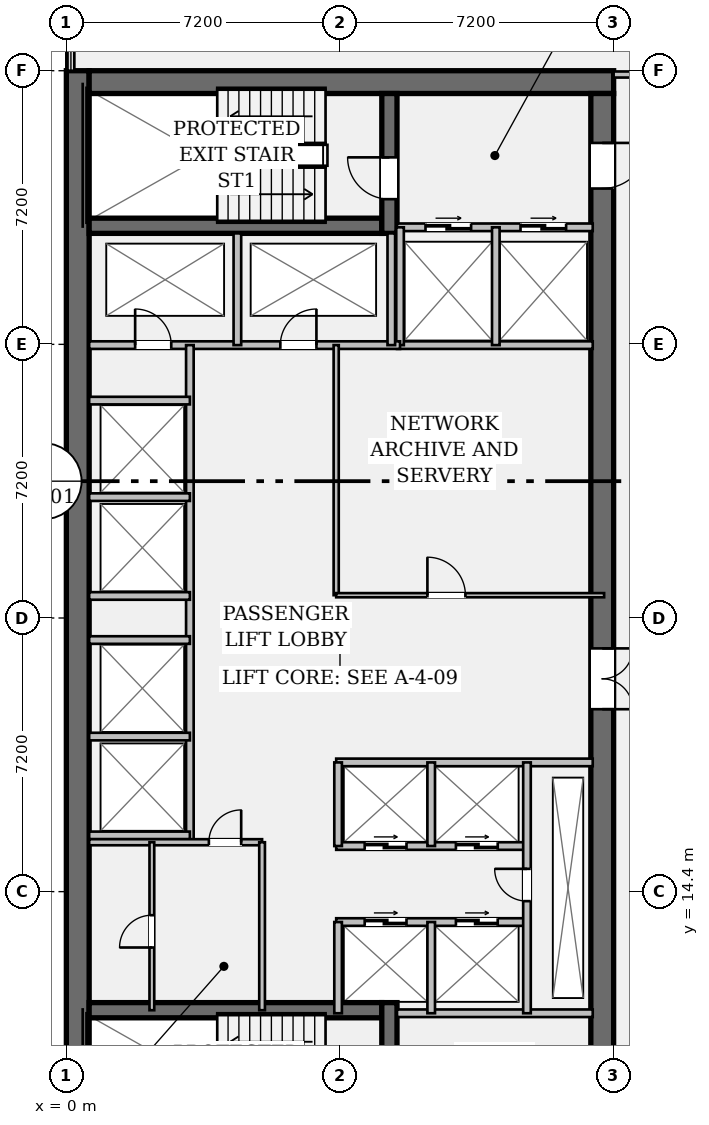
"""IFC4 building model, lengths in metres.
Left out: names, types, materials, properties, quantities, classifications, styles, units other than length and angle.
Written with IfcOpenShell. Run it as: python <this file> out.ifc"""

import sys

from ifc_helpers import new_model, si_unit, direction, frame, frame_2d, origin, place, context, subcontext, project, spatial, rectangle, extrude, element, fill, save


model = new_model("IFC4")
c1 = context("Model", 3, precision=1e-05, world=origin(), true_north=direction((0.0, 1.0)))
c2 = subcontext(c1, "Body", "Model", "MODEL_VIEW")
j1 = project(units=[si_unit("LENGTHUNIT", "METRE"), si_unit("PLANEANGLEUNIT", "RADIAN")], contexts=[c1])
p1 = place(None, origin())
s1 = spatial("IfcSite", under=j1, at=p1, CompositionType="ELEMENT")
p2 = place(p1, origin())
s2 = spatial("IfcBuilding", under=s1, at=p2, CompositionType="ELEMENT")
p3 = place(p2, frame((0.0, 0.0, 148.4)))
s3 = spatial("IfcBuildingStorey", under=s2, at=p3, CompositionType="ELEMENT", Elevation=148.4)
p4 = place(p3, frame((0.3, 7.2, 0.0), z_axis=(0.0, 0.0, 1.0), x_axis=(0.0, 1.0, 0.0)))
e1 = element("IfcWall", 1, at=p4, inside=s3, PredefinedType="SHEAR", context=c2, shape_type="SweptSolid", body=[
    extrude(rectangle(XDim=28.8, YDim=0.6, at=frame_2d((14.4, 0.0))), origin(), (0.0, 0.0, 1.0), 3.58),
])
p5 = place(p3, frame((0.6, 35.7, 0.0), z_axis=(0.0, 0.0, 1.0), x_axis=(1.0, 0.0, 0.0)))
e2 = element("IfcWall", 2, at=p5, inside=s3, PredefinedType="SHEAR", context=c2, shape_type="SweptSolid", body=[
    extrude(rectangle(XDim=13.8, YDim=0.6, at=frame_2d((6.9, 0.0))), origin(), (0.0, 0.0, 1.0), 3.58),
])
p6 = place(p3, frame((14.1, 35.4, 0.0), z_axis=(0.0, 0.0, 1.0), x_axis=(0.0, -1.0, 0.0)))
e3 = element("IfcWall", 3, at=p6, inside=s3, PredefinedType="SHEAR", context=c2, shape_type="SweptSolid", body=[
    extrude(rectangle(XDim=27.6, YDim=0.6, at=frame_2d((13.8, 0.0))), origin(), (0.0, 0.0, 1.0), 3.58),
])
p7 = place(p6, frame((1.3, 0.0, 0.0)))
e4 = element("IfcOpeningElement", 4, at=p7, cuts=e3, PredefinedType="OPENING", context=c2, shape_type="SweptSolid", body=[
    extrude(rectangle(XDim=1.2, YDim=2.15, at=frame_2d((0.6, 1.075))), frame((0.0, 0.312, 0.0), z_axis=(0.0, -1.0, 0.0), x_axis=(1.0, 0.0, 0.0)), (0.0, 0.0, 1.0), 0.624),
])
p8 = place(p6, frame((25.25, 0.0, 0.0)))
e5 = element("IfcOpeningElement", 5, at=p8, cuts=e3, PredefinedType="OPENING", context=c2, shape_type="SweptSolid", body=[
    extrude(rectangle(XDim=1.2, YDim=2.15, at=frame_2d((0.6, 1.075))), frame((0.0, 0.312, 0.0), z_axis=(0.0, -1.0, 0.0), x_axis=(1.0, 0.0, 0.0)), (0.0, 0.0, 1.0), 0.624),
])
p9 = place(p6, frame((14.6, 0.0, 0.0)))
e6 = element("IfcOpeningElement", 6, at=p9, cuts=e3, PredefinedType="OPENING", context=c2, shape_type="SweptSolid", body=[
    extrude(rectangle(XDim=1.6, YDim=2.2, at=frame_2d((0.8, 1.1))), frame((0.0, 0.312, 0.0), z_axis=(0.0, -1.0, 0.0), x_axis=(1.0, 0.0, 0.0)), (0.0, 0.0, 1.0), 0.624),
])
for number, where, z_axis, x_axis in (
    (7, (0.6, 31.92, 0.0), (0.0, 0.0, 1.0), (1.0, 0.0, 0.0)),
    (8, (0.6, 11.28, 0.0), (0.0, 0.0, 1.0), (1.0, 0.0, 0.0)),
):
    element("IfcWall", number, at=place(p3, frame(where, z_axis=z_axis, x_axis=x_axis)), inside=s3, PredefinedType="SHEAR", context=c2, shape_type="SweptSolid", body=[
        extrude(rectangle(XDim=7.7, YDim=0.4, at=frame_2d((3.85, 0.0))), origin(), (0.0, 0.0, 1.0), 3.58),
    ])
p10 = place(p3, frame((8.5, 31.72, 0.0), z_axis=(0.0, 0.0, 1.0), x_axis=(0.0, 1.0, 0.0)))
e9 = element("IfcWall", 9, at=p10, inside=s3, PredefinedType="SHEAR", context=c2, shape_type="SweptSolid", body=[
    extrude(rectangle(XDim=3.68, YDim=0.4, at=frame_2d((1.84, 0.0))), origin(), (0.0, 0.0, 1.0), 3.58),
])
p11 = place(p10, frame((0.9, 0.0, 0.0)))
e10 = element("IfcOpeningElement", 10, at=p11, cuts=e9, PredefinedType="OPENING", context=c2, shape_type="SweptSolid", body=[
    extrude(rectangle(XDim=1.1, YDim=2.15, at=frame_2d((0.55, 1.075))), frame((0.0, 0.212, 0.0), z_axis=(0.0, -1.0, 0.0), x_axis=(1.0, 0.0, 0.0)), (0.0, 0.0, 1.0), 0.424),
])
p12 = place(p3, frame((8.5, 7.8, 0.0), z_axis=(0.0, 0.0, 1.0), x_axis=(0.0, 1.0, 0.0)))
e11 = element("IfcWall", 11, at=p12, inside=s3, PredefinedType="SHEAR", context=c2, shape_type="SweptSolid", body=[
    extrude(rectangle(XDim=3.68, YDim=0.4, at=frame_2d((1.84, 0.0))), origin(), (0.0, 0.0, 1.0), 3.58),
])
p13 = place(p12, frame((0.85, 0.0, 0.0)))
e12 = element("IfcOpeningElement", 12, at=p13, cuts=e11, PredefinedType="OPENING", context=c2, shape_type="SweptSolid", body=[
    extrude(rectangle(XDim=1.1, YDim=2.15, at=frame_2d((0.55, 1.075))), frame((0.0, 0.212, 0.0), z_axis=(0.0, -1.0, 0.0), x_axis=(1.0, 0.0, 0.0)), (0.0, 0.0, 1.0), 0.424),
])
p14 = place(p3, frame((8.7, 31.88, 0.0), z_axis=(0.0, 0.0, 1.0), x_axis=(1.0, 0.0, 0.0)))
e13 = element("IfcWall", 13, at=p14, inside=s3, PredefinedType="PARTITIONING", context=c2, shape_type="SweptSolid", body=[
    extrude(rectangle(XDim=5.15, YDim=0.2, at=frame_2d((2.575, 0.0))), origin(), (0.0, 0.0, 1.0), 3.58),
])
p15 = place(p14, frame((0.75, 0.0, 0.0)))
e14 = element("IfcOpeningElement", 14, at=p15, cuts=e13, PredefinedType="OPENING", context=c2, shape_type="SweptSolid", body=[
    extrude(rectangle(XDim=1.2, YDim=2.2, at=frame_2d((0.6, 1.1))), frame((0.0, 0.112, 0.0), z_axis=(0.0, -1.0, 0.0), x_axis=(1.0, 0.0, 0.0)), (0.0, 0.0, 1.0), 0.224),
])
p16 = place(p14, frame((3.25, 0.0, 0.0)))
e15 = element("IfcOpeningElement", 15, at=p16, cuts=e13, PredefinedType="OPENING", context=c2, shape_type="SweptSolid", body=[
    extrude(rectangle(XDim=1.2, YDim=2.2, at=frame_2d((0.6, 1.1))), frame((0.0, 0.112, 0.0), z_axis=(0.0, -1.0, 0.0), x_axis=(1.0, 0.0, 0.0)), (0.0, 0.0, 1.0), 0.224),
])
for number, where, z_axis, x_axis in (
    (16, (8.7, 11.2, 0.0), (0.0, 0.0, 1.0), (1.0, 0.0, 0.0)),
    (17, (8.7, 28.78, 0.0), (0.0, 0.0, 1.0), (1.0, 0.0, 0.0)),
):
    element("IfcWall", number, at=place(p3, frame(where, z_axis=z_axis, x_axis=x_axis)), inside=s3, PredefinedType="PARTITIONING", context=c2, shape_type="SweptSolid", body=[
        extrude(rectangle(XDim=5.15, YDim=0.2, at=frame_2d((2.575, 0.0))), origin(), (0.0, 0.0, 1.0), 3.58),
    ])
for number, where, z_axis, x_axis in (
    (18, (8.78, 28.78, 0.0), (0.0, 0.0, 1.0), (0.0, 1.0, 0.0)),
    (19, (11.3, 28.78, 0.0), (0.0, 0.0, 1.0), (0.0, 1.0, 0.0)),
):
    element("IfcWall", number, at=place(p3, frame(where, z_axis=z_axis, x_axis=x_axis)), inside=s3, PredefinedType="PARTITIONING", context=c2, shape_type="SweptSolid", body=[
        extrude(rectangle(XDim=3.1, YDim=0.2, at=frame_2d((1.55, 0.0))), origin(), (0.0, 0.0, 1.0), 3.58),
    ])
p17 = place(p3, frame((0.6, 28.78, 0.0), z_axis=(0.0, 0.0, 1.0), x_axis=(1.0, 0.0, 0.0)))
e20 = element("IfcWall", 20, at=p17, inside=s3, PredefinedType="PARTITIONING", context=c2, shape_type="SweptSolid", body=[
    extrude(rectangle(XDim=8.18, YDim=0.2, at=frame_2d((4.09, 0.0))), origin(), (0.0, 0.0, 1.0), 3.58),
])
p18 = place(p17, frame((1.21, 0.0, 0.0)))
e21 = element("IfcOpeningElement", 21, at=p18, cuts=e20, PredefinedType="OPENING", context=c2, shape_type="SweptSolid", body=[
    extrude(rectangle(XDim=0.95, YDim=2.15, at=frame_2d((0.475, 1.075))), frame((0.0, 0.112, 0.0), z_axis=(0.0, -1.0, 0.0), x_axis=(1.0, 0.0, 0.0)), (0.0, 0.0, 1.0), 0.224),
])
p19 = place(p17, frame((5.03, 0.0, 0.0)))
e22 = element("IfcOpeningElement", 22, at=p19, cuts=e20, PredefinedType="OPENING", context=c2, shape_type="SweptSolid", body=[
    extrude(rectangle(XDim=0.95, YDim=2.15, at=frame_2d((0.475, 1.075))), frame((0.0, 0.112, 0.0), z_axis=(0.0, -1.0, 0.0), x_axis=(1.0, 0.0, 0.0)), (0.0, 0.0, 1.0), 0.224),
])
for number, where, z_axis, x_axis in (
    (23, (4.5, 28.78, 0.0), (0.0, 0.0, 1.0), (0.0, 1.0, 0.0)),
    (24, (8.55, 28.78, 0.0), (0.0, 0.0, 1.0), (0.0, 1.0, 0.0)),
):
    element("IfcWall", number, at=place(p3, frame(where, z_axis=z_axis, x_axis=x_axis)), inside=s3, PredefinedType="PARTITIONING", context=c2, shape_type="SweptSolid", body=[
        extrude(rectangle(XDim=2.94, YDim=0.2, at=frame_2d((1.47, 0.0))), origin(), (0.0, 0.0, 1.0), 3.58),
    ])
p20 = place(p3, frame((3.25, 15.7, 0.0), z_axis=(0.0, 0.0, 1.0), x_axis=(0.0, 1.0, 0.0)))
e25 = element("IfcWall", 25, at=p20, inside=s3, PredefinedType="PARTITIONING", context=c2, shape_type="SweptSolid", body=[
    extrude(rectangle(XDim=13.08, YDim=0.2, at=frame_2d((6.54, 0.0))), origin(), (0.0, 0.0, 1.0), 3.58),
])
for number, where, z_axis, x_axis in (
    (26, (0.6, 15.88, 0.0), (0.0, 0.0, 1.0), (1.0, 0.0, 0.0)),
    (27, (0.6, 18.48, 0.0), (0.0, 0.0, 1.0), (1.0, 0.0, 0.0)),
    (28, (0.6, 22.18, 0.0), (0.0, 0.0, 1.0), (1.0, 0.0, 0.0)),
    (29, (0.6, 24.78, 0.0), (0.0, 0.0, 1.0), (1.0, 0.0, 0.0)),
    (30, (0.6, 21.02, 0.0), (0.0, 0.0, 1.0), (1.0, 0.0, 0.0)),
    (31, (0.6, 27.32, 0.0), (0.0, 0.0, 1.0), (1.0, 0.0, 0.0)),
):
    element("IfcWall", number, at=place(p3, frame(where, z_axis=z_axis, x_axis=x_axis)), inside=s3, PredefinedType="PARTITIONING", context=c2, shape_type="SweptSolid", body=[
        extrude(rectangle(XDim=2.65, YDim=0.2, at=frame_2d((1.325, 0.0))), origin(), (0.0, 0.0, 1.0), 3.58),
    ])
p21 = place(p3, frame((7.1, 22.2, 0.0), z_axis=(0.0, 0.0, 1.0), x_axis=(0.0, 1.0, 0.0)))
e32 = element("IfcWall", 32, at=p21, inside=s3, PredefinedType="PARTITIONING", context=c2, shape_type="SweptSolid", body=[
    extrude(rectangle(XDim=6.58, YDim=0.135, at=frame_2d((3.29, 0.0))), origin(), (0.0, 0.0, 1.0), 3.58),
])
p22 = place(p3, frame((7.1, 22.2, 0.0), z_axis=(0.0, 0.0, 1.0), x_axis=(1.0, 0.0, 0.0)))
e33 = element("IfcWall", 33, at=p22, inside=s3, PredefinedType="PARTITIONING", context=c2, shape_type="SweptSolid", body=[
    extrude(rectangle(XDim=7.05, YDim=0.11, at=frame_2d((3.525, 0.0))), origin(), (0.0, 0.0, 1.0), 3.58),
])
p23 = place(p22, frame((2.4, 0.0, 0.0)))
e34 = element("IfcOpeningElement", 34, at=p23, cuts=e33, PredefinedType="OPENING", context=c2, shape_type="SweptSolid", body=[
    extrude(rectangle(XDim=1.0, YDim=2.15, at=frame_2d((0.5, 1.075))), frame((0.0, 0.067, 0.0), z_axis=(0.0, -1.0, 0.0), x_axis=(1.0, 0.0, 0.0)), (0.0, 0.0, 1.0), 0.134),
])
p24 = place(p3, frame((7.1, 17.8, 0.0), z_axis=(0.0, 0.0, 1.0), x_axis=(1.0, 0.0, 0.0)))
e35 = element("IfcWall", 35, at=p24, inside=s3, PredefinedType="PARTITIONING", context=c2, shape_type="SweptSolid", body=[
    extrude(rectangle(XDim=6.75, YDim=0.2, at=frame_2d((3.375, 0.0))), origin(), (0.0, 0.0, 1.0), 3.58),
])
p25 = place(p3, frame((7.1, 15.6, 0.0), z_axis=(0.0, 0.0, 1.0), x_axis=(1.0, 0.0, 0.0)))
e36 = element("IfcWall", 36, at=p25, inside=s3, PredefinedType="PARTITIONING", context=c2, shape_type="SweptSolid", body=[
    extrude(rectangle(XDim=5.02, YDim=0.2, at=frame_2d((2.51, 0.0))), origin(), (0.0, 0.0, 1.0), 3.58),
])
p26 = place(p25, frame((0.75, 0.0, 0.0)))
e37 = element("IfcOpeningElement", 37, at=p26, cuts=e36, PredefinedType="OPENING", context=c2, shape_type="SweptSolid", body=[
    extrude(rectangle(XDim=1.1, YDim=2.2, at=frame_2d((0.55, 1.1))), frame((0.0, 0.112, 0.0), z_axis=(0.0, -1.0, 0.0), x_axis=(1.0, 0.0, 0.0)), (0.0, 0.0, 1.0), 0.224),
])
p27 = place(p25, frame((3.15, 0.0, 0.0)))
e38 = element("IfcOpeningElement", 38, at=p27, cuts=e36, PredefinedType="OPENING", context=c2, shape_type="SweptSolid", body=[
    extrude(rectangle(XDim=1.1, YDim=2.2, at=frame_2d((0.55, 1.1))), frame((0.0, 0.112, 0.0), z_axis=(0.0, -1.0, 0.0), x_axis=(1.0, 0.0, 0.0)), (0.0, 0.0, 1.0), 0.224),
])
p28 = place(p3, frame((7.1, 13.6, 0.0), z_axis=(0.0, 0.0, 1.0), x_axis=(1.0, 0.0, 0.0)))
e39 = element("IfcWall", 39, at=p28, inside=s3, PredefinedType="PARTITIONING", context=c2, shape_type="SweptSolid", body=[
    extrude(rectangle(XDim=5.02, YDim=0.2, at=frame_2d((2.51, 0.0))), origin(), (0.0, 0.0, 1.0), 3.58),
])
p29 = place(p28, frame((0.75, 0.0, 0.0)))
e40 = element("IfcOpeningElement", 40, at=p29, cuts=e39, PredefinedType="OPENING", context=c2, shape_type="SweptSolid", body=[
    extrude(rectangle(XDim=1.1, YDim=2.2, at=frame_2d((0.55, 1.1))), frame((0.0, 0.112, 0.0), z_axis=(0.0, -1.0, 0.0), x_axis=(1.0, 0.0, 0.0)), (0.0, 0.0, 1.0), 0.224),
])
p30 = place(p28, frame((3.15, 0.0, 0.0)))
e41 = element("IfcOpeningElement", 41, at=p30, cuts=e39, PredefinedType="OPENING", context=c2, shape_type="SweptSolid", body=[
    extrude(rectangle(XDim=1.1, YDim=2.2, at=frame_2d((0.55, 1.1))), frame((0.0, 0.112, 0.0), z_axis=(0.0, -1.0, 0.0), x_axis=(1.0, 0.0, 0.0)), (0.0, 0.0, 1.0), 0.224),
])
p31 = place(p3, frame((7.15, 15.6, 0.0), z_axis=(0.0, 0.0, 1.0), x_axis=(0.0, 1.0, 0.0)))
e42 = element("IfcWall", 42, at=p31, inside=s3, PredefinedType="PARTITIONING", context=c2, shape_type="SweptSolid", body=[
    extrude(rectangle(XDim=2.2, YDim=0.2, at=frame_2d((1.1, 0.0))), origin(), (0.0, 0.0, 1.0), 3.58),
])
p32 = place(p3, frame((7.15, 11.2, 0.0), z_axis=(0.0, 0.0, 1.0), x_axis=(0.0, 1.0, 0.0)))
e43 = element("IfcWall", 43, at=p32, inside=s3, PredefinedType="PARTITIONING", context=c2, shape_type="SweptSolid", body=[
    extrude(rectangle(XDim=2.4, YDim=0.2, at=frame_2d((1.2, 0.0))), origin(), (0.0, 0.0, 1.0), 3.58),
])
p33 = place(p3, frame((9.6, 15.6, 0.0), z_axis=(0.0, 0.0, 1.0), x_axis=(0.0, 1.0, 0.0)))
e44 = element("IfcWall", 44, at=p33, inside=s3, PredefinedType="PARTITIONING", context=c2, shape_type="SweptSolid", body=[
    extrude(rectangle(XDim=2.2, YDim=0.2, at=frame_2d((1.1, 0.0))), origin(), (0.0, 0.0, 1.0), 3.58),
])
p34 = place(p3, frame((9.6, 11.2, 0.0), z_axis=(0.0, 0.0, 1.0), x_axis=(0.0, 1.0, 0.0)))
e45 = element("IfcWall", 45, at=p34, inside=s3, PredefinedType="PARTITIONING", context=c2, shape_type="SweptSolid", body=[
    extrude(rectangle(XDim=2.4, YDim=0.2, at=frame_2d((1.2, 0.0))), origin(), (0.0, 0.0, 1.0), 3.58),
])
p35 = place(p3, frame((12.12, 11.2, 0.0), z_axis=(0.0, 0.0, 1.0), x_axis=(0.0, 1.0, 0.0)))
e46 = element("IfcWall", 46, at=p35, inside=s3, PredefinedType="PARTITIONING", context=c2, shape_type="SweptSolid", body=[
    extrude(rectangle(XDim=6.6, YDim=0.2, at=frame_2d((3.3, 0.0))), origin(), (0.0, 0.0, 1.0), 3.58),
])
p36 = place(p35, frame((2.95, 0.0, 0.0)))
e47 = element("IfcOpeningElement", 47, at=p36, cuts=e46, PredefinedType="OPENING", context=c2, shape_type="SweptSolid", body=[
    extrude(rectangle(XDim=0.85, YDim=2.15, at=frame_2d((0.425, 1.075))), frame((0.0, 0.112, 0.0), z_axis=(0.0, -1.0, 0.0), x_axis=(1.0, 0.0, 0.0)), (0.0, 0.0, 1.0), 0.224),
])
p37 = place(p3, frame((0.6, 15.7, 0.0), z_axis=(0.0, 0.0, 1.0), x_axis=(1.0, 0.0, 0.0)))
e48 = element("IfcWall", 48, at=p37, inside=s3, PredefinedType="PARTITIONING", context=c2, shape_type="SweptSolid", body=[
    extrude(rectangle(XDim=4.55, YDim=0.16, at=frame_2d((2.275, 0.0))), origin(), (0.0, 0.0, 1.0), 3.58),
])
p38 = place(p37, frame((3.15, 0.0, 0.0)))
e49 = element("IfcOpeningElement", 49, at=p38, cuts=e48, PredefinedType="OPENING", context=c2, shape_type="SweptSolid", body=[
    extrude(rectangle(XDim=0.85, YDim=2.15, at=frame_2d((0.425, 1.075))), frame((0.0, 0.092, 0.0), z_axis=(0.0, -1.0, 0.0), x_axis=(1.0, 0.0, 0.0)), (0.0, 0.0, 1.0), 0.184),
])
p39 = place(p3, frame((5.15, 11.28, 0.0), z_axis=(0.0, 0.0, 1.0), x_axis=(0.0, 1.0, 0.0)))
e50 = element("IfcWall", 50, at=p39, inside=s3, PredefinedType="PARTITIONING", context=c2, shape_type="SweptSolid", body=[
    extrude(rectangle(XDim=4.42, YDim=0.15, at=frame_2d((2.21, 0.0))), origin(), (0.0, 0.0, 1.0), 3.58),
])
p40 = place(p3, frame((2.25, 11.28, 0.0), z_axis=(0.0, 0.0, 1.0), x_axis=(0.0, 1.0, 0.0)))
e51 = element("IfcWall", 51, at=p40, inside=s3, PredefinedType="PARTITIONING", context=c2, shape_type="SweptSolid", body=[
    extrude(rectangle(XDim=4.42, YDim=0.125, at=frame_2d((2.21, 0.0))), origin(), (0.0, 0.0, 1.0), 3.58),
])
p41 = place(p40, frame((1.65, 0.0, 0.0)))
e52 = element("IfcOpeningElement", 52, at=p41, cuts=e51, PredefinedType="OPENING", context=c2, shape_type="SweptSolid", body=[
    extrude(rectangle(XDim=0.85, YDim=2.15, at=frame_2d((0.425, 1.075))), frame((0.0, 0.074, 0.0), z_axis=(0.0, -1.0, 0.0), x_axis=(1.0, 0.0, 0.0)), (0.0, 0.0, 1.0), 0.149),
])
p42 = place(p3, frame((14.4, 35.9, 0.0), z_axis=(0.0, 0.0, 1.0), x_axis=(1.0, 0.0, 0.0)))
e53 = element("IfcWall", 53, at=p42, inside=s3, PredefinedType="PARTITIONING", context=c2, shape_type="SweptSolid", body=[
    extrude(rectangle(XDim=2.95, YDim=0.16, at=frame_2d((1.475, 0.0))), origin(), (0.0, 0.0, 1.0), 2.869),
])
p43 = place(p42, frame((0.95, 0.0, 0.0)))
e54 = element("IfcOpeningElement", 54, at=p43, cuts=e53, PredefinedType="OPENING", context=c2, shape_type="SweptSolid", body=[
    extrude(rectangle(XDim=1.0, YDim=2.15, at=frame_2d((0.5, 1.075))), frame((0.0, 0.092, 0.0), z_axis=(0.0, -1.0, 0.0), x_axis=(1.0, 0.0, 0.0)), (0.0, 0.0, 1.0), 0.184),
])
p44 = place(p11, origin())
e55 = element("IfcDoor", 55, at=p44, inside=s3, OperationType="SINGLE_SWING_RIGHT", PredefinedType="DOOR", context=c2, shape_type="SweptSolid", body=[
    extrude(rectangle(XDim=1.1, YDim=2.15, at=frame_2d((0.55, 1.075))), frame((0.0, 0.025, 0.0), z_axis=(0.0, -1.0, 0.0), x_axis=(1.0, 0.0, 0.0)), (0.0, 0.0, 1.0), 0.05),
])
fill(e10, e55)
p45 = place(p7, origin())
e56 = element("IfcDoor", 56, at=p45, inside=s3, OperationType="SINGLE_SWING_LEFT", PredefinedType="DOOR", context=c2, shape_type="SweptSolid", body=[
    extrude(rectangle(XDim=1.2, YDim=2.15, at=frame_2d((0.6, 1.075))), frame((0.0, 0.025, 0.0), z_axis=(0.0, -1.0, 0.0), x_axis=(1.0, 0.0, 0.0)), (0.0, 0.0, 1.0), 0.05),
])
fill(e4, e56)
p46 = place(p15, origin())
e57 = element("IfcDoor", 57, at=p46, inside=s3, OperationType="DOUBLE_DOOR_SLIDING", PredefinedType="DOOR", context=c2, shape_type="SweptSolid", body=[
    extrude(rectangle(XDim=1.2, YDim=2.2, at=frame_2d((0.6, 1.1))), frame((0.0, 0.025, 0.0), z_axis=(0.0, -1.0, 0.0), x_axis=(1.0, 0.0, 0.0)), (0.0, 0.0, 1.0), 0.05),
])
fill(e14, e57)
p47 = place(p16, origin())
e58 = element("IfcDoor", 58, at=p47, inside=s3, OperationType="DOUBLE_DOOR_SLIDING", PredefinedType="DOOR", context=c2, shape_type="SweptSolid", body=[
    extrude(rectangle(XDim=1.2, YDim=2.2, at=frame_2d((0.6, 1.1))), frame((0.0, 0.025, 0.0), z_axis=(0.0, -1.0, 0.0), x_axis=(1.0, 0.0, 0.0)), (0.0, 0.0, 1.0), 0.05),
])
fill(e15, e58)
p48 = place(p18, origin())
e59 = element("IfcDoor", 59, at=p48, inside=s3, OperationType="SINGLE_SWING_LEFT", PredefinedType="DOOR", context=c2, shape_type="SweptSolid", body=[
    extrude(rectangle(XDim=0.95, YDim=2.15, at=frame_2d((0.475, 1.075))), frame((0.0, 0.025, 0.0), z_axis=(0.0, -1.0, 0.0), x_axis=(1.0, 0.0, 0.0)), (0.0, 0.0, 1.0), 0.05),
])
fill(e21, e59)
p49 = place(p19, origin())
e60 = element("IfcDoor", 60, at=p49, inside=s3, OperationType="SINGLE_SWING_RIGHT", PredefinedType="DOOR", context=c2, shape_type="SweptSolid", body=[
    extrude(rectangle(XDim=0.95, YDim=2.15, at=frame_2d((0.475, 1.075))), frame((0.0, 0.025, 0.0), z_axis=(0.0, -1.0, 0.0), x_axis=(1.0, 0.0, 0.0)), (0.0, 0.0, 1.0), 0.05),
])
fill(e22, e60)
p50 = place(p9, origin())
e61 = element("IfcDoor", 61, at=p50, inside=s3, OperationType="DOUBLE_DOOR_SINGLE_SWING", PredefinedType="DOOR", context=c2, shape_type="SweptSolid", body=[
    extrude(rectangle(XDim=1.6, YDim=2.2, at=frame_2d((0.8, 1.1))), frame((0.0, 0.025, 0.0), z_axis=(0.0, -1.0, 0.0), x_axis=(1.0, 0.0, 0.0)), (0.0, 0.0, 1.0), 0.05),
])
fill(e6, e61)
p51 = place(p23, origin())
e62 = element("IfcDoor", 62, at=p51, inside=s3, OperationType="SINGLE_SWING_LEFT", PredefinedType="DOOR", context=c2, shape_type="SweptSolid", body=[
    extrude(rectangle(XDim=1.0, YDim=2.15, at=frame_2d((0.5, 1.075))), frame((0.0, 0.025, 0.0), z_axis=(0.0, -1.0, 0.0), x_axis=(1.0, 0.0, 0.0)), (0.0, 0.0, 1.0), 0.05),
])
fill(e34, e62)
p52 = place(p36, origin())
e63 = element("IfcDoor", 63, at=p52, inside=s3, OperationType="SINGLE_SWING_RIGHT", PredefinedType="DOOR", context=c2, shape_type="SweptSolid", body=[
    extrude(rectangle(XDim=0.85, YDim=2.15, at=frame_2d((0.425, 1.075))), frame((0.0, 0.025, 0.0), z_axis=(0.0, -1.0, 0.0), x_axis=(1.0, 0.0, 0.0)), (0.0, 0.0, 1.0), 0.05),
])
fill(e47, e63)
p53 = place(p26, origin())
e64 = element("IfcDoor", 64, at=p53, inside=s3, OperationType="DOUBLE_DOOR_SLIDING", PredefinedType="DOOR", context=c2, shape_type="SweptSolid", body=[
    extrude(rectangle(XDim=1.1, YDim=2.2, at=frame_2d((0.55, 1.1))), frame((0.0, 0.025, 0.0), z_axis=(0.0, -1.0, 0.0), x_axis=(1.0, 0.0, 0.0)), (0.0, 0.0, 1.0), 0.05),
])
fill(e37, e64)
p54 = place(p27, origin())
e65 = element("IfcDoor", 65, at=p54, inside=s3, OperationType="DOUBLE_DOOR_SLIDING", PredefinedType="DOOR", context=c2, shape_type="SweptSolid", body=[
    extrude(rectangle(XDim=1.1, YDim=2.2, at=frame_2d((0.55, 1.1))), frame((0.0, 0.025, 0.0), z_axis=(0.0, -1.0, 0.0), x_axis=(1.0, 0.0, 0.0)), (0.0, 0.0, 1.0), 0.05),
])
fill(e38, e65)
p55 = place(p29, origin())
e66 = element("IfcDoor", 66, at=p55, inside=s3, OperationType="DOUBLE_DOOR_SLIDING", PredefinedType="DOOR", context=c2, shape_type="SweptSolid", body=[
    extrude(rectangle(XDim=1.1, YDim=2.2, at=frame_2d((0.55, 1.1))), frame((0.0, 0.025, 0.0), z_axis=(0.0, -1.0, 0.0), x_axis=(1.0, 0.0, 0.0)), (0.0, 0.0, 1.0), 0.05),
])
fill(e40, e66)
p56 = place(p30, origin())
e67 = element("IfcDoor", 67, at=p56, inside=s3, OperationType="DOUBLE_DOOR_SLIDING", PredefinedType="DOOR", context=c2, shape_type="SweptSolid", body=[
    extrude(rectangle(XDim=1.1, YDim=2.2, at=frame_2d((0.55, 1.1))), frame((0.0, 0.025, 0.0), z_axis=(0.0, -1.0, 0.0), x_axis=(1.0, 0.0, 0.0)), (0.0, 0.0, 1.0), 0.05),
])
fill(e41, e67)
p57 = place(p38, origin())
e68 = element("IfcDoor", 68, at=p57, inside=s3, OperationType="SINGLE_SWING_RIGHT", PredefinedType="DOOR", context=c2, shape_type="SweptSolid", body=[
    extrude(rectangle(XDim=0.85, YDim=2.15, at=frame_2d((0.425, 1.075))), frame((0.0, 0.025, 0.0), z_axis=(0.0, -1.0, 0.0), x_axis=(1.0, 0.0, 0.0)), (0.0, 0.0, 1.0), 0.05),
])
fill(e49, e68)
p58 = place(p41, origin())
e69 = element("IfcDoor", 69, at=p58, inside=s3, OperationType="SINGLE_SWING_LEFT", PredefinedType="DOOR", context=c2, shape_type="SweptSolid", body=[
    extrude(rectangle(XDim=0.85, YDim=2.15, at=frame_2d((0.425, 1.075))), frame((0.0, 0.025, 0.0), z_axis=(0.0, -1.0, 0.0), x_axis=(1.0, 0.0, 0.0)), (0.0, 0.0, 1.0), 0.05),
])
fill(e52, e69)
save(model, sys.argv[1])
